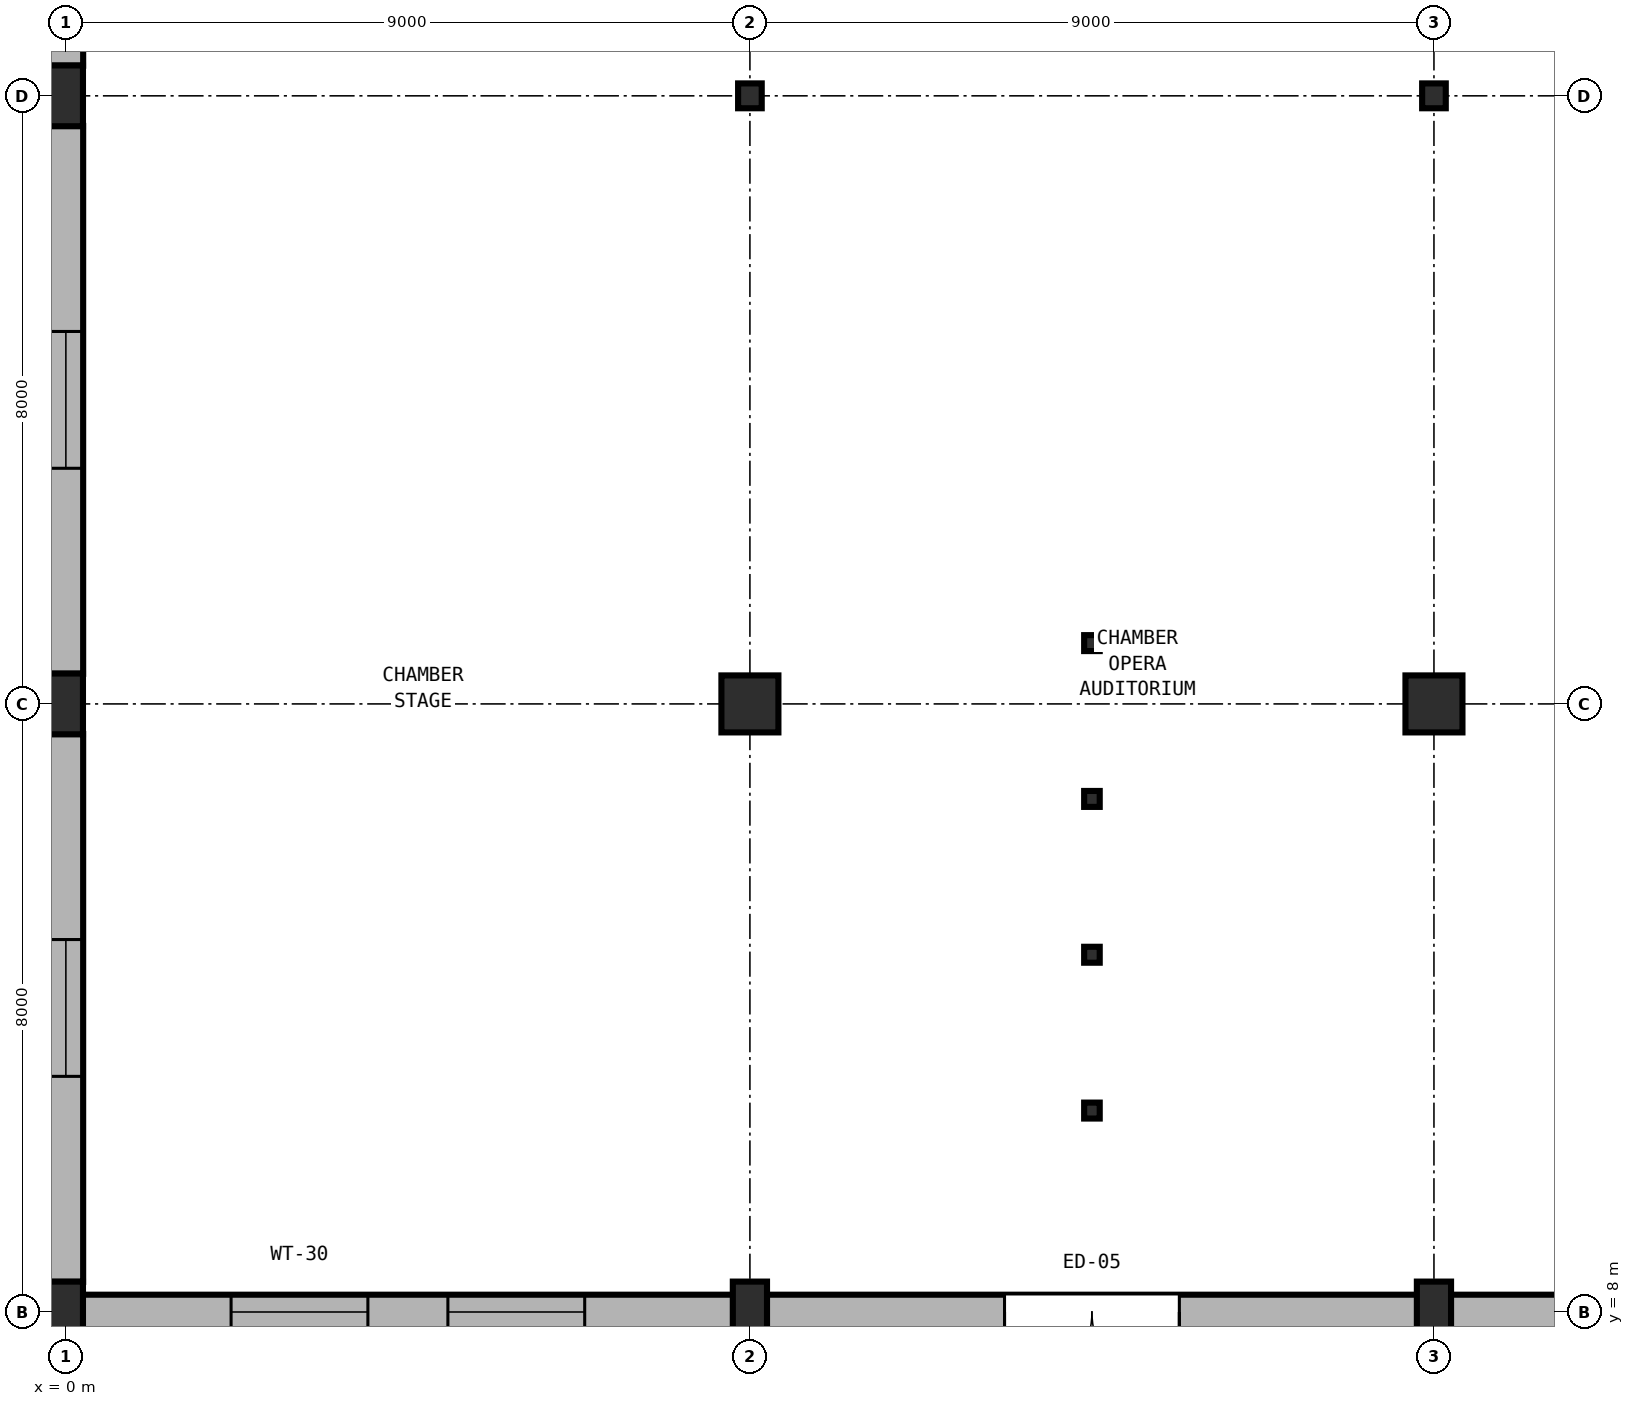
"""IFC4 building model, lengths in metres.
Left out: names, types, materials, properties, quantities, classifications, styles, units other than length and angle.
Written with IfcOpenShell. Run it as: python <this file> out.ifc"""

import sys

from ifc_helpers import new_model, si_unit, direction, frame, frame_2d, origin, origin_2d, place, context, subcontext, project, spatial, rectangle, i_section, extrude, element, fill, save


model = new_model("IFC4")
c1 = context("Model", 3, precision=1e-05, world=origin(), true_north=direction((0.0, 1.0)))
c2 = subcontext(c1, "Body", "Model", "MODEL_VIEW")
j1 = project(units=[si_unit("LENGTHUNIT", "METRE"), si_unit("PLANEANGLEUNIT", "RADIAN")], contexts=[c1])
p1 = place(None, origin())
s1 = spatial("IfcSite", under=j1, at=p1, CompositionType="ELEMENT")
p2 = place(p1, origin())
s2 = spatial("IfcBuilding", under=s1, at=p2, CompositionType="ELEMENT")
p3 = place(p2, origin())
s3 = spatial("IfcBuildingStorey", under=s2, at=p3, CompositionType="ELEMENT", Elevation=0.0)
for number, where, z_axis, x_axis in (
    (1, (0.0, 8.0, 0.0), (0.0, 0.0, 1.0), (1.0, 0.0, 0.0)),
    (2, (0.0, 16.0, 0.0), (0.0, 0.0, 1.0), (1.0, 0.0, 0.0)),
    (3, (0.0, 24.0, 0.0), (0.0, 0.0, 1.0), (1.0, 0.0, 0.0)),
    (4, (9.0, 8.0, 0.0), (0.0, 0.0, 1.0), (1.0, 0.0, 0.0)),
):
    element("IfcColumn", number, at=place(p3, frame(where, z_axis=z_axis, x_axis=x_axis)), inside=s3, PredefinedType="PILASTER", context=c2, shape_type="SweptSolid", body=[
        extrude(rectangle(XDim=0.45, YDim=0.8, at=origin_2d()), origin(), (0.0, 0.0, 1.0), 5.12),
    ])
p4 = place(p3, frame((9.0, 16.0, 0.0), z_axis=(0.0, 0.0, 1.0), x_axis=(1.0, 0.0, 0.0)))
e5 = element("IfcColumn", 5, at=p4, inside=s3, PredefinedType="COLUMN", context=c2, shape_type="SweptSolid", body=[
    extrude(rectangle(XDim=0.75, YDim=0.75, at=origin_2d()), origin(), (0.0, 0.0, 1.0), 5.12),
])
p5 = place(p3, frame((9.0, 24.0, 0.0), z_axis=(0.0, 0.0, 1.0), x_axis=(1.0, 0.0, 0.0)))
e6 = element("IfcColumn", 6, at=p5, inside=s3, PredefinedType="COLUMN", context=c2, shape_type="SweptSolid", body=[
    extrude(i_section(OverallWidth=0.311, OverallDepth=0.327, WebThickness=0.016, FlangeThickness=0.025, FilletRadius=0.017, at=origin_2d()), origin(), (0.0, 0.0, 1.0), 5.12),
])
p6 = place(p3, frame((18.0, 8.0, 0.0), z_axis=(0.0, 0.0, 1.0), x_axis=(1.0, 0.0, 0.0)))
e7 = element("IfcColumn", 7, at=p6, inside=s3, PredefinedType="PILASTER", context=c2, shape_type="SweptSolid", body=[
    extrude(rectangle(XDim=0.45, YDim=0.8, at=origin_2d()), origin(), (0.0, 0.0, 1.0), 5.12),
])
p7 = place(p3, frame((18.0, 16.0, 0.0), z_axis=(0.0, 0.0, 1.0), x_axis=(1.0, 0.0, 0.0)))
e8 = element("IfcColumn", 8, at=p7, inside=s3, PredefinedType="COLUMN", context=c2, shape_type="SweptSolid", body=[
    extrude(rectangle(XDim=0.75, YDim=0.75, at=origin_2d()), origin(), (0.0, 0.0, 1.0), 5.12),
])
p8 = place(p3, frame((18.0, 24.0, 0.0), z_axis=(0.0, 0.0, 1.0), x_axis=(1.0, 0.0, 0.0)))
e9 = element("IfcColumn", 9, at=p8, inside=s3, PredefinedType="COLUMN", context=c2, shape_type="SweptSolid", body=[
    extrude(i_section(OverallWidth=0.311, OverallDepth=0.327, WebThickness=0.016, FlangeThickness=0.025, FilletRadius=0.017, at=origin_2d()), origin(), (0.0, 0.0, 1.0), 5.12),
])
for number, where, z_axis, x_axis in (
    (10, (13.5, 10.65, 0.0), (0.0, 0.0, 1.0), (1.0, 0.0, 0.0)),
    (11, (13.5, 12.7, 0.0), (0.0, 0.0, 1.0), (1.0, 0.0, 0.0)),
    (12, (13.5, 14.75, 0.0), (0.0, 0.0, 1.0), (1.0, 0.0, 0.0)),
    (13, (13.5, 16.8, 0.0), (0.0, 0.0, 1.0), (1.0, 0.0, 0.0)),
):
    element("IfcColumn", number, at=place(p3, frame(where, z_axis=z_axis, x_axis=x_axis)), inside=s3, PredefinedType="COLUMN", context=c2, shape_type="SweptSolid", body=[
        extrude(i_section(OverallWidth=0.205, OverallDepth=0.21, WebThickness=0.009, FlangeThickness=0.014, FilletRadius=0.011, at=origin_2d()), origin(), (0.0, 0.0, 1.0), 5.12),
    ])
p9 = place(p3, frame((0.221, 8.0, 0.0), z_axis=(0.0, 0.0, 1.0), x_axis=(1.0, 0.0, 0.0)))
e14 = element("IfcWall", 14, at=p9, inside=s3, PredefinedType="SOLIDWALL", context=c2, shape_type="SweptSolid", body=[
    extrude(rectangle(XDim=8.558, YDim=0.455, at=frame_2d((4.279, 0.0))), origin(), (0.0, 0.0, 1.0), 4.731),
])
p10 = place(p9, frame((1.953, 0.0, 0.85)))
e15 = element("IfcOpeningElement", 15, at=p10, cuts=e14, PredefinedType="OPENING", context=c2, shape_type="SweptSolid", body=[
    extrude(rectangle(XDim=1.8, YDim=2.65, at=frame_2d((0.9, 1.325))), frame((0.0, 0.238, 0.0), z_axis=(0.0, -1.0, 0.0), x_axis=(1.0, 0.0, 0.0)), (0.0, 0.0, 1.0), 0.475),
])
p11 = place(p9, frame((4.805, 0.0, 0.85)))
e16 = element("IfcOpeningElement", 16, at=p11, cuts=e14, PredefinedType="OPENING", context=c2, shape_type="SweptSolid", body=[
    extrude(rectangle(XDim=1.8, YDim=2.65, at=frame_2d((0.9, 1.325))), frame((0.0, 0.238, 0.0), z_axis=(0.0, -1.0, 0.0), x_axis=(1.0, 0.0, 0.0)), (0.0, 0.0, 1.0), 0.475),
])
p12 = place(p3, frame((17.779, 8.0, 0.0), z_axis=(0.0, 0.0, 1.0), x_axis=(-1.0, 0.0, 0.0)))
e17 = element("IfcWall", 17, at=p12, inside=s3, PredefinedType="SOLIDWALL", context=c2, shape_type="SweptSolid", body=[
    extrude(rectangle(XDim=8.558, YDim=0.455, at=frame_2d((4.279, 0.0))), origin(), (0.0, 0.0, 1.0), 4.731),
])
p13 = place(p12, frame((3.129, 0.0, 0.0)))
e18 = element("IfcOpeningElement", 18, at=p13, cuts=e17, PredefinedType="OPENING", context=c2, shape_type="SweptSolid", body=[
    extrude(rectangle(XDim=2.3, YDim=2.45, at=frame_2d((1.15, 1.225))), frame((0.0, 0.238, 0.0), z_axis=(0.0, -1.0, 0.0), x_axis=(1.0, 0.0, 0.0)), (0.0, 0.0, 1.0), 0.475),
])
p14 = place(p3, frame((26.779, 8.0, 0.0), z_axis=(0.0, 0.0, 1.0), x_axis=(-1.0, 0.0, 0.0)))
e19 = element("IfcWall", 19, at=p14, inside=s3, PredefinedType="SOLIDWALL", context=c2, shape_type="SweptSolid", body=[
    extrude(rectangle(XDim=8.558, YDim=0.455, at=frame_2d((4.279, 0.0))), origin(), (0.0, 0.0, 1.0), 4.731),
])
p15 = place(p14, frame((3.179, 0.0, 0.0)))
e20 = element("IfcOpeningElement", 20, at=p15, cuts=e19, PredefinedType="OPENING", context=c2, shape_type="SweptSolid", body=[
    extrude(rectangle(XDim=2.2, YDim=2.4, at=frame_2d((1.1, 1.2))), frame((0.0, 0.238, 0.0), z_axis=(0.0, -1.0, 0.0), x_axis=(1.0, 0.0, 0.0)), (0.0, 0.0, 1.0), 0.475),
])
p16 = place(p3, frame((0.0, 8.396, 0.0), z_axis=(0.0, 0.0, 1.0), x_axis=(0.0, 1.0, 0.0)))
e21 = element("IfcWall", 21, at=p16, inside=s3, PredefinedType="SOLIDWALL", context=c2, shape_type="SweptSolid", body=[
    extrude(rectangle(XDim=7.208, YDim=0.455, at=frame_2d((3.604, 0.0))), origin(), (0.0, 0.0, 1.0), 4.731),
])
p17 = place(p16, frame((2.704, 0.0, 0.85)))
e22 = element("IfcOpeningElement", 22, at=p17, cuts=e21, PredefinedType="OPENING", context=c2, shape_type="SweptSolid", body=[
    extrude(rectangle(XDim=1.8, YDim=2.65, at=frame_2d((0.9, 1.325))), frame((0.0, 0.238, 0.0), z_axis=(0.0, -1.0, 0.0), x_axis=(1.0, 0.0, 0.0)), (0.0, 0.0, 1.0), 0.475),
])
p18 = place(p3, frame((0.0, 16.396, 0.0), z_axis=(0.0, 0.0, 1.0), x_axis=(0.0, 1.0, 0.0)))
e23 = element("IfcWall", 23, at=p18, inside=s3, PredefinedType="SOLIDWALL", context=c2, shape_type="SweptSolid", body=[
    extrude(rectangle(XDim=7.208, YDim=0.455, at=frame_2d((3.604, 0.0))), origin(), (0.0, 0.0, 1.0), 4.731),
])
p19 = place(p18, frame((2.704, 0.0, 0.85)))
e24 = element("IfcOpeningElement", 24, at=p19, cuts=e23, PredefinedType="OPENING", context=c2, shape_type="SweptSolid", body=[
    extrude(rectangle(XDim=1.8, YDim=2.65, at=frame_2d((0.9, 1.325))), frame((0.0, 0.238, 0.0), z_axis=(0.0, -1.0, 0.0), x_axis=(1.0, 0.0, 0.0)), (0.0, 0.0, 1.0), 0.475),
])
p20 = place(p3, frame((0.0, 24.396, 0.0), z_axis=(0.0, 0.0, 1.0), x_axis=(0.0, 1.0, 0.0)))
e25 = element("IfcWall", 25, at=p20, inside=s3, PredefinedType="SOLIDWALL", context=c2, shape_type="SweptSolid", body=[
    extrude(rectangle(XDim=7.208, YDim=0.455, at=frame_2d((3.604, 0.0))), origin(), (0.0, 0.0, 1.0), 4.731),
])
p21 = place(p20, frame((2.554, 0.0, 0.0)))
e26 = element("IfcOpeningElement", 26, at=p21, cuts=e25, PredefinedType="OPENING", context=c2, shape_type="SweptSolid", body=[
    extrude(rectangle(XDim=2.1, YDim=2.35, at=frame_2d((1.05, 1.175))), frame((0.0, 0.238, 0.0), z_axis=(0.0, -1.0, 0.0), x_axis=(1.0, 0.0, 0.0)), (0.0, 0.0, 1.0), 0.475),
])
p22 = place(p10, origin())
e27 = element("IfcWindow", 27, at=p22, inside=s3, PartitioningType="SINGLE_PANEL", PredefinedType="WINDOW", context=c2, shape_type="SweptSolid", body=[
    extrude(rectangle(XDim=1.8, YDim=2.65, at=frame_2d((0.9, 1.325))), frame((0.0, 0.03, 0.0), z_axis=(0.0, -1.0, 0.0), x_axis=(1.0, 0.0, 0.0)), (0.0, 0.0, 1.0), 0.06),
])
fill(e15, e27)
p23 = place(p11, origin())
e28 = element("IfcWindow", 28, at=p23, inside=s3, PartitioningType="SINGLE_PANEL", PredefinedType="WINDOW", context=c2, shape_type="SweptSolid", body=[
    extrude(rectangle(XDim=1.8, YDim=2.65, at=frame_2d((0.9, 1.325))), frame((0.0, 0.03, 0.0), z_axis=(0.0, -1.0, 0.0), x_axis=(1.0, 0.0, 0.0)), (0.0, 0.0, 1.0), 0.06),
])
fill(e16, e28)
p24 = place(p13, origin())
e29 = element("IfcDoor", 29, at=p24, inside=s3, OperationType="DOUBLE_DOOR_SINGLE_SWING", PredefinedType="DOOR", context=c2, shape_type="SweptSolid", body=[
    extrude(rectangle(XDim=2.3, YDim=2.45, at=frame_2d((1.15, 1.225))), frame((0.0, 0.025, 0.0), z_axis=(0.0, -1.0, 0.0), x_axis=(1.0, 0.0, 0.0)), (0.0, 0.0, 1.0), 0.05),
])
fill(e18, e29)
p25 = place(p17, origin())
e30 = element("IfcWindow", 30, at=p25, inside=s3, PartitioningType="SINGLE_PANEL", PredefinedType="WINDOW", context=c2, shape_type="SweptSolid", body=[
    extrude(rectangle(XDim=1.8, YDim=2.65, at=frame_2d((0.9, 1.325))), frame((0.0, 0.03, 0.0), z_axis=(0.0, -1.0, 0.0), x_axis=(1.0, 0.0, 0.0)), (0.0, 0.0, 1.0), 0.06),
])
fill(e22, e30)
p26 = place(p19, origin())
e31 = element("IfcWindow", 31, at=p26, inside=s3, PartitioningType="SINGLE_PANEL", PredefinedType="WINDOW", context=c2, shape_type="SweptSolid", body=[
    extrude(rectangle(XDim=1.8, YDim=2.65, at=frame_2d((0.9, 1.325))), frame((0.0, 0.03, 0.0), z_axis=(0.0, -1.0, 0.0), x_axis=(1.0, 0.0, 0.0)), (0.0, 0.0, 1.0), 0.06),
])
fill(e24, e31)
save(model, sys.argv[1])
